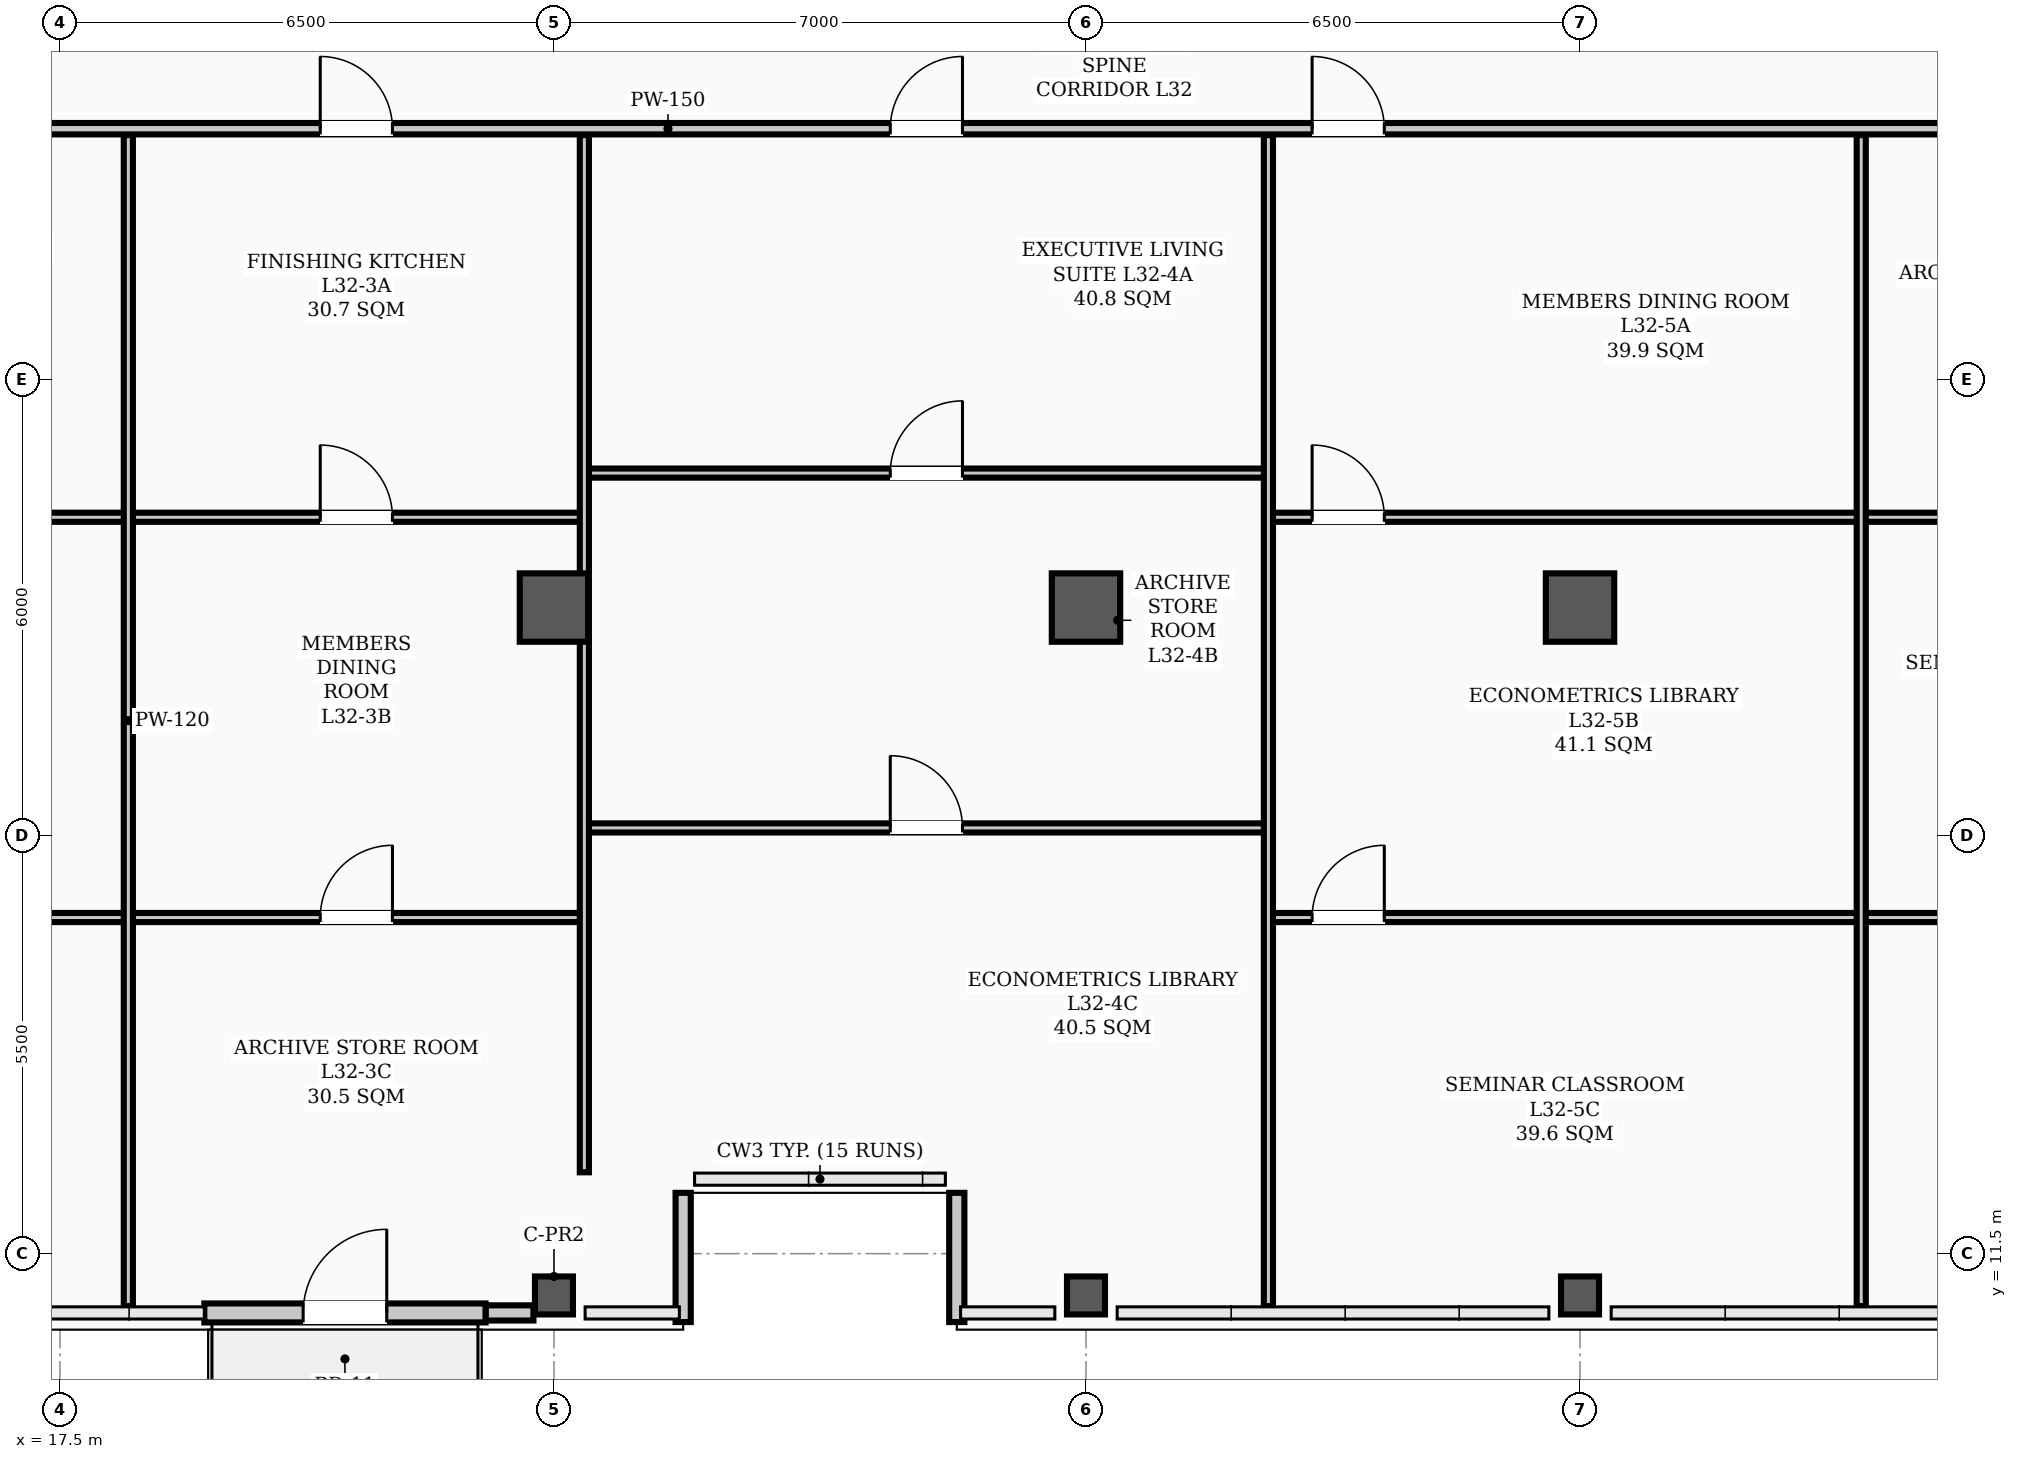
"""IFC4 building model, lengths in metres.
Left out: names, types, materials, properties, quantities, classifications, styles, units other than length and angle.
Written with IfcOpenShell. Run it as: python <this file> out.ifc"""

import sys

from ifc_helpers import new_model, si_unit, direction, frame, frame_2d, origin, origin_2d, place, context, subcontext, project, spatial, rectangle, hollow_rectangle, extrude, element, fill, save


model = new_model("IFC4")
c1 = context("Model", 3, precision=1e-05, world=origin(), true_north=direction((0.0, 1.0)))
c2 = subcontext(c1, "Body", "Model", "MODEL_VIEW")
j1 = project(units=[si_unit("LENGTHUNIT", "METRE"), si_unit("PLANEANGLEUNIT", "RADIAN")], contexts=[c1])
p1 = place(None, origin())
s1 = spatial("IfcSite", under=j1, at=p1, CompositionType="ELEMENT")
p2 = place(p1, origin())
s2 = spatial("IfcBuilding", under=s1, at=p2, CompositionType="ELEMENT")
p3 = place(p2, frame((0.0, 0.0, 130.5)))
s3 = spatial("IfcBuildingStorey", under=s2, at=p3, CompositionType="ELEMENT", Elevation=130.5)
for number, where, z_axis, x_axis in (
    (1, (24.0, 20.0, 0.0), (0.0, 0.0, 1.0), (1.0, 0.0, 0.0)),
    (2, (31.0, 20.0, 0.0), (0.0, 0.0, 1.0), (1.0, 0.0, 0.0)),
    (3, (37.5, 20.0, 0.0), (0.0, 0.0, 1.0), (1.0, 0.0, 0.0)),
):
    element("IfcColumn", number, at=place(p3, frame(where, z_axis=z_axis, x_axis=x_axis)), inside=s3, PredefinedType="COLUMN", context=c2, shape_type="SweptSolid", body=[
        extrude(hollow_rectangle(XDim=0.9, YDim=0.9, WallThickness=0.035, InnerFilletRadius=0.017, OuterFilletRadius=0.052, at=origin_2d()), origin(), (0.0, 0.0, 1.0), 3.9),
    ])
for number, where, z_axis, x_axis in (
    (4, (24.0, 10.95, 0.0), (0.0, 0.0, 1.0), (1.0, 0.0, 0.0)),
    (5, (31.0, 10.95, 0.0), (0.0, 0.0, 1.0), (1.0, 0.0, 0.0)),
    (6, (37.5, 10.95, 0.0), (0.0, 0.0, 1.0), (1.0, 0.0, 0.0)),
):
    element("IfcColumn", number, at=place(p3, frame(where, z_axis=z_axis, x_axis=x_axis)), inside=s3, PredefinedType="COLUMN", context=c2, shape_type="SweptSolid", body=[
        extrude(hollow_rectangle(XDim=0.5, YDim=0.5, WallThickness=0.024, InnerFilletRadius=0.012, OuterFilletRadius=0.036, at=origin_2d()), origin(), (0.0, 0.0, 1.0), 3.9),
    ])
p4 = place(p3, frame((23.1, 10.72, 0.0), z_axis=(0.0, 0.0, 1.0), x_axis=(1.0, 0.0, 0.0)))
e7 = element("IfcWall", 7, at=p4, inside=s3, PredefinedType="PARAPET", context=c2, shape_type="SweptSolid", body=[
    extrude(rectangle(XDim=0.63, YDim=0.2, at=frame_2d((0.315, 0.0))), origin(), (0.0, 0.0, 1.0), 1.2),
])
for number, where, z_axis, x_axis in (
    (8, (25.7, 10.6, 0.0), (0.0, 0.0, 1.0), (0.0, 1.0, 0.0)),
    (9, (29.3, 12.3, 0.0), (0.0, 0.0, 1.0), (0.0, -1.0, 0.0)),
):
    element("IfcWall", number, at=place(p3, frame(where, z_axis=z_axis, x_axis=x_axis)), inside=s3, PredefinedType="PARAPET", context=c2, shape_type="SweptSolid", body=[
        extrude(rectangle(XDim=1.7, YDim=0.2, at=frame_2d((0.85, 0.0))), origin(), (0.0, 0.0, 1.0), 1.2),
    ])
p5 = place(p3, frame((19.4, 10.72, 0.0), z_axis=(0.0, 0.0, 1.0), x_axis=(1.0, 0.0, 0.0)))
e10 = element("IfcWall", 10, at=p5, inside=s3, PredefinedType="STANDARD", context=c2, shape_type="SweptSolid", body=[
    extrude(rectangle(XDim=3.7, YDim=0.25, at=frame_2d((1.85, 0.0))), origin(), (0.0, 0.0, 1.0), 3.18),
])
p6 = place(p5, frame((1.3, 0.0, 0.0)))
e11 = element("IfcOpeningElement", 11, at=p6, cuts=e10, PredefinedType="OPENING", context=c2, shape_type="SweptSolid", body=[
    extrude(rectangle(XDim=1.1, YDim=2.2, at=frame_2d((0.55, 1.1))), frame((0.0, 0.135, 0.0), z_axis=(0.0, -1.0, 0.0), x_axis=(1.0, 0.0, 0.0)), (0.0, 0.0, 1.0), 0.27),
])
p7 = place(p3, frame((2.31, 26.3, 0.0), z_axis=(0.0, 0.0, 1.0), x_axis=(1.0, 0.0, 0.0)))
e12 = element("IfcWall", 12, at=p7, inside=s3, PredefinedType="PARTITIONING", context=c2, shape_type="SweptSolid", body=[
    extrude(rectangle(XDim=46.38, YDim=0.15, at=frame_2d((23.19, 0.0))), origin(), (0.0, 0.0, 1.0), 3.1),
])
p8 = place(p7, frame((12.515, 0.0, 0.0)))
e13 = element("IfcOpeningElement", 13, at=p8, cuts=e12, PredefinedType="OPENING", context=c2, shape_type="SweptSolid", body=[
    extrude(rectangle(XDim=0.95, YDim=2.08, at=frame_2d((0.475, 1.04))), frame((0.0, 0.085, 0.0), z_axis=(0.0, -1.0, 0.0), x_axis=(1.0, 0.0, 0.0)), (0.0, 0.0, 1.0), 0.17),
])
p9 = place(p7, frame((18.615, 0.0, 0.0)))
e14 = element("IfcOpeningElement", 14, at=p9, cuts=e12, PredefinedType="OPENING", context=c2, shape_type="SweptSolid", body=[
    extrude(rectangle(XDim=0.95, YDim=2.08, at=frame_2d((0.475, 1.04))), frame((0.0, 0.085, 0.0), z_axis=(0.0, -1.0, 0.0), x_axis=(1.0, 0.0, 0.0)), (0.0, 0.0, 1.0), 0.17),
])
p10 = place(p7, frame((26.115, 0.0, 0.0)))
e15 = element("IfcOpeningElement", 15, at=p10, cuts=e12, PredefinedType="OPENING", context=c2, shape_type="SweptSolid", body=[
    extrude(rectangle(XDim=0.95, YDim=2.08, at=frame_2d((0.475, 1.04))), frame((0.0, 0.085, 0.0), z_axis=(0.0, -1.0, 0.0), x_axis=(1.0, 0.0, 0.0)), (0.0, 0.0, 1.0), 0.17),
])
p11 = place(p7, frame((31.665, 0.0, 0.0)))
e16 = element("IfcOpeningElement", 16, at=p11, cuts=e12, PredefinedType="OPENING", context=c2, shape_type="SweptSolid", body=[
    extrude(rectangle(XDim=0.95, YDim=2.08, at=frame_2d((0.475, 1.04))), frame((0.0, 0.085, 0.0), z_axis=(0.0, -1.0, 0.0), x_axis=(1.0, 0.0, 0.0)), (0.0, 0.0, 1.0), 0.17),
])
p12 = place(p7, frame((43.06, 0.0, 0.0)))
e17 = element("IfcOpeningElement", 17, at=p12, cuts=e12, PredefinedType="OPENING", context=c2, shape_type="SweptSolid", body=[
    extrude(rectangle(XDim=0.95, YDim=2.08, at=frame_2d((0.475, 1.04))), frame((0.0, 0.085, 0.0), z_axis=(0.0, -1.0, 0.0), x_axis=(1.0, 0.0, 0.0)), (0.0, 0.0, 1.0), 0.17),
])
p13 = place(p3, frame((12.2, 21.188, 0.0), z_axis=(0.0, 0.0, 1.0), x_axis=(1.0, 0.0, 0.0)))
e18 = element("IfcWall", 18, at=p13, inside=s3, PredefinedType="PARTITIONING", context=c2, shape_type="SweptSolid", body=[
    extrude(rectangle(XDim=6.2, YDim=0.12, at=frame_2d((3.1, 0.0))), origin(), (0.0, 0.0, 1.0), 3.1),
])
p14 = place(p13, frame((2.625, 0.0, 0.0)))
e19 = element("IfcOpeningElement", 19, at=p14, cuts=e18, PredefinedType="OPENING", context=c2, shape_type="SweptSolid", body=[
    extrude(rectangle(XDim=0.95, YDim=2.08, at=frame_2d((0.475, 1.04))), frame((0.0, 0.07, 0.0), z_axis=(0.0, -1.0, 0.0), x_axis=(1.0, 0.0, 0.0)), (0.0, 0.0, 1.0), 0.14),
])
p15 = place(p3, frame((12.2, 15.922, 0.0), z_axis=(0.0, 0.0, 1.0), x_axis=(1.0, 0.0, 0.0)))
e20 = element("IfcWall", 20, at=p15, inside=s3, PredefinedType="PARTITIONING", context=c2, shape_type="SweptSolid", body=[
    extrude(rectangle(XDim=6.2, YDim=0.12, at=frame_2d((3.1, 0.0))), origin(), (0.0, 0.0, 1.0), 3.1),
])
p16 = place(p15, frame((2.625, 0.0, 0.0)))
e21 = element("IfcOpeningElement", 21, at=p16, cuts=e20, PredefinedType="OPENING", context=c2, shape_type="SweptSolid", body=[
    extrude(rectangle(XDim=0.95, YDim=2.08, at=frame_2d((0.475, 1.04))), frame((0.0, 0.07, 0.0), z_axis=(0.0, -1.0, 0.0), x_axis=(1.0, 0.0, 0.0)), (0.0, 0.0, 1.0), 0.14),
])
p17 = place(p3, frame((18.4, 21.188, 0.0), z_axis=(0.0, 0.0, 1.0), x_axis=(1.0, 0.0, 0.0)))
e22 = element("IfcWall", 22, at=p17, inside=s3, PredefinedType="PARTITIONING", context=c2, shape_type="SweptSolid", body=[
    extrude(rectangle(XDim=6.0, YDim=0.12, at=frame_2d((3.0, 0.0))), origin(), (0.0, 0.0, 1.0), 3.1),
])
p18 = place(p17, frame((2.525, 0.0, 0.0)))
e23 = element("IfcOpeningElement", 23, at=p18, cuts=e22, PredefinedType="OPENING", context=c2, shape_type="SweptSolid", body=[
    extrude(rectangle(XDim=0.95, YDim=2.08, at=frame_2d((0.475, 1.04))), frame((0.0, 0.07, 0.0), z_axis=(0.0, -1.0, 0.0), x_axis=(1.0, 0.0, 0.0)), (0.0, 0.0, 1.0), 0.14),
])
p19 = place(p3, frame((18.4, 15.922, 0.0), z_axis=(0.0, 0.0, 1.0), x_axis=(1.0, 0.0, 0.0)))
e24 = element("IfcWall", 24, at=p19, inside=s3, PredefinedType="PARTITIONING", context=c2, shape_type="SweptSolid", body=[
    extrude(rectangle(XDim=6.0, YDim=0.12, at=frame_2d((3.0, 0.0))), origin(), (0.0, 0.0, 1.0), 3.1),
])
p20 = place(p19, frame((2.525, 0.0, 0.0)))
e25 = element("IfcOpeningElement", 25, at=p20, cuts=e24, PredefinedType="OPENING", context=c2, shape_type="SweptSolid", body=[
    extrude(rectangle(XDim=0.95, YDim=2.08, at=frame_2d((0.475, 1.04))), frame((0.0, 0.07, 0.0), z_axis=(0.0, -1.0, 0.0), x_axis=(1.0, 0.0, 0.0)), (0.0, 0.0, 1.0), 0.14),
])
p21 = place(p3, frame((24.4, 21.769, 0.0), z_axis=(0.0, 0.0, 1.0), x_axis=(1.0, 0.0, 0.0)))
e26 = element("IfcWall", 26, at=p21, inside=s3, PredefinedType="PARTITIONING", context=c2, shape_type="SweptSolid", body=[
    extrude(rectangle(XDim=9.0, YDim=0.12, at=frame_2d((4.5, 0.0))), origin(), (0.0, 0.0, 1.0), 3.1),
])
p22 = place(p21, frame((4.025, 0.0, 0.0)))
e27 = element("IfcOpeningElement", 27, at=p22, cuts=e26, PredefinedType="OPENING", context=c2, shape_type="SweptSolid", body=[
    extrude(rectangle(XDim=0.95, YDim=2.08, at=frame_2d((0.475, 1.04))), frame((0.0, 0.07, 0.0), z_axis=(0.0, -1.0, 0.0), x_axis=(1.0, 0.0, 0.0)), (0.0, 0.0, 1.0), 0.14),
])
p23 = place(p3, frame((24.4, 17.101, 0.0), z_axis=(0.0, 0.0, 1.0), x_axis=(1.0, 0.0, 0.0)))
e28 = element("IfcWall", 28, at=p23, inside=s3, PredefinedType="PARTITIONING", context=c2, shape_type="SweptSolid", body=[
    extrude(rectangle(XDim=9.0, YDim=0.12, at=frame_2d((4.5, 0.0))), origin(), (0.0, 0.0, 1.0), 3.1),
])
p24 = place(p23, frame((4.025, 0.0, 0.0)))
e29 = element("IfcOpeningElement", 29, at=p24, cuts=e28, PredefinedType="OPENING", context=c2, shape_type="SweptSolid", body=[
    extrude(rectangle(XDim=0.95, YDim=2.08, at=frame_2d((0.475, 1.04))), frame((0.0, 0.07, 0.0), z_axis=(0.0, -1.0, 0.0), x_axis=(1.0, 0.0, 0.0)), (0.0, 0.0, 1.0), 0.14),
])
p25 = place(p3, frame((33.4, 21.188, 0.0), z_axis=(0.0, 0.0, 1.0), x_axis=(1.0, 0.0, 0.0)))
e30 = element("IfcWall", 30, at=p25, inside=s3, PredefinedType="PARTITIONING", context=c2, shape_type="SweptSolid", body=[
    extrude(rectangle(XDim=7.8, YDim=0.12, at=frame_2d((3.9, 0.0))), origin(), (0.0, 0.0, 1.0), 3.1),
])
p26 = place(p25, frame((0.575, 0.0, 0.0)))
e31 = element("IfcOpeningElement", 31, at=p26, cuts=e30, PredefinedType="OPENING", context=c2, shape_type="SweptSolid", body=[
    extrude(rectangle(XDim=0.95, YDim=2.08, at=frame_2d((0.475, 1.04))), frame((0.0, 0.07, 0.0), z_axis=(0.0, -1.0, 0.0), x_axis=(1.0, 0.0, 0.0)), (0.0, 0.0, 1.0), 0.14),
])
p27 = place(p3, frame((33.4, 15.922, 0.0), z_axis=(0.0, 0.0, 1.0), x_axis=(1.0, 0.0, 0.0)))
e32 = element("IfcWall", 32, at=p27, inside=s3, PredefinedType="PARTITIONING", context=c2, shape_type="SweptSolid", body=[
    extrude(rectangle(XDim=7.8, YDim=0.12, at=frame_2d((3.9, 0.0))), origin(), (0.0, 0.0, 1.0), 3.1),
])
p28 = place(p27, frame((0.575, 0.0, 0.0)))
e33 = element("IfcOpeningElement", 33, at=p28, cuts=e32, PredefinedType="OPENING", context=c2, shape_type="SweptSolid", body=[
    extrude(rectangle(XDim=0.95, YDim=2.08, at=frame_2d((0.475, 1.04))), frame((0.0, 0.07, 0.0), z_axis=(0.0, -1.0, 0.0), x_axis=(1.0, 0.0, 0.0)), (0.0, 0.0, 1.0), 0.14),
])
p29 = place(p3, frame((41.2, 21.188, 0.0), z_axis=(0.0, 0.0, 1.0), x_axis=(1.0, 0.0, 0.0)))
e34 = element("IfcWall", 34, at=p29, inside=s3, PredefinedType="PARTITIONING", context=c2, shape_type="SweptSolid", body=[
    extrude(rectangle(XDim=7.49, YDim=0.12, at=frame_2d((3.745, 0.0))), origin(), (0.0, 0.0, 1.0), 3.1),
])
p30 = place(p29, frame((4.17, 0.0, 0.0)))
e35 = element("IfcOpeningElement", 35, at=p30, cuts=e34, PredefinedType="OPENING", context=c2, shape_type="SweptSolid", body=[
    extrude(rectangle(XDim=0.95, YDim=2.08, at=frame_2d((0.475, 1.04))), frame((0.0, 0.07, 0.0), z_axis=(0.0, -1.0, 0.0), x_axis=(1.0, 0.0, 0.0)), (0.0, 0.0, 1.0), 0.14),
])
p31 = place(p3, frame((41.2, 15.922, 0.0), z_axis=(0.0, 0.0, 1.0), x_axis=(1.0, 0.0, 0.0)))
e36 = element("IfcWall", 36, at=p31, inside=s3, PredefinedType="PARTITIONING", context=c2, shape_type="SweptSolid", body=[
    extrude(rectangle(XDim=7.49, YDim=0.12, at=frame_2d((3.745, 0.0))), origin(), (0.0, 0.0, 1.0), 3.1),
])
p32 = place(p31, frame((4.17, 0.0, 0.0)))
e37 = element("IfcOpeningElement", 37, at=p32, cuts=e36, PredefinedType="OPENING", context=c2, shape_type="SweptSolid", body=[
    extrude(rectangle(XDim=0.95, YDim=2.08, at=frame_2d((0.475, 1.04))), frame((0.0, 0.07, 0.0), z_axis=(0.0, -1.0, 0.0), x_axis=(1.0, 0.0, 0.0)), (0.0, 0.0, 1.0), 0.14),
])
p33 = place(p3, frame((18.4, 10.81, 0.0), z_axis=(0.0, 0.0, 1.0), x_axis=(0.0, 1.0, 0.0)))
e38 = element("IfcWall", 38, at=p33, inside=s3, PredefinedType="PARTITIONING", context=c2, shape_type="SweptSolid", body=[
    extrude(rectangle(XDim=15.405, YDim=0.12, at=frame_2d((7.703, 0.0))), origin(), (0.0, 0.0, 1.0), 3.0),
])
p34 = place(p3, frame((24.4, 12.57, 0.0), z_axis=(0.0, 0.0, 1.0), x_axis=(0.0, 1.0, 0.0)))
e39 = element("IfcWall", 39, at=p34, inside=s3, PredefinedType="PARTITIONING", context=c2, shape_type="SweptSolid", body=[
    extrude(rectangle(XDim=13.645, YDim=0.12, at=frame_2d((6.823, 0.0))), origin(), (0.0, 0.0, 1.0), 3.0),
])
for number, where, z_axis, x_axis in (
    (40, (33.4, 10.81, 0.0), (0.0, 0.0, 1.0), (0.0, 1.0, 0.0)),
    (41, (41.2, 10.81, 0.0), (0.0, 0.0, 1.0), (0.0, 1.0, 0.0)),
):
    element("IfcWall", number, at=place(p3, frame(where, z_axis=z_axis, x_axis=x_axis)), inside=s3, PredefinedType="PARTITIONING", context=c2, shape_type="SweptSolid", body=[
        extrude(rectangle(XDim=15.405, YDim=0.12, at=frame_2d((7.703, 0.0))), origin(), (0.0, 0.0, 1.0), 3.0),
    ])
p35 = place(p6, origin())
e42 = element("IfcDoor", 42, at=p35, inside=s3, OperationType="SINGLE_SWING_RIGHT", PredefinedType="DOOR", context=c2, shape_type="SweptSolid", body=[
    extrude(rectangle(XDim=1.1, YDim=2.2, at=frame_2d((0.55, 1.1))), frame((0.0, 0.025, 0.0), z_axis=(0.0, -1.0, 0.0), x_axis=(1.0, 0.0, 0.0)), (0.0, 0.0, 1.0), 0.05),
])
fill(e11, e42)
p36 = place(p18, origin())
e43 = element("IfcDoor", 43, at=p36, inside=s3, OperationType="SINGLE_SWING_LEFT", PredefinedType="DOOR", context=c2, shape_type="SweptSolid", body=[
    extrude(rectangle(XDim=0.95, YDim=2.08, at=frame_2d((0.475, 1.04))), frame((0.0, 0.025, 0.0), z_axis=(0.0, -1.0, 0.0), x_axis=(1.0, 0.0, 0.0)), (0.0, 0.0, 1.0), 0.05),
])
fill(e23, e43)
p37 = place(p20, origin())
e44 = element("IfcDoor", 44, at=p37, inside=s3, OperationType="SINGLE_SWING_RIGHT", PredefinedType="DOOR", context=c2, shape_type="SweptSolid", body=[
    extrude(rectangle(XDim=0.95, YDim=2.08, at=frame_2d((0.475, 1.04))), frame((0.0, 0.025, 0.0), z_axis=(0.0, -1.0, 0.0), x_axis=(1.0, 0.0, 0.0)), (0.0, 0.0, 1.0), 0.05),
])
fill(e25, e44)
p38 = place(p9, origin())
e45 = element("IfcDoor", 45, at=p38, inside=s3, OperationType="SINGLE_SWING_LEFT", PredefinedType="DOOR", context=c2, shape_type="SweptSolid", body=[
    extrude(rectangle(XDim=0.95, YDim=2.08, at=frame_2d((0.475, 1.04))), frame((0.0, 0.025, 0.0), z_axis=(0.0, -1.0, 0.0), x_axis=(1.0, 0.0, 0.0)), (0.0, 0.0, 1.0), 0.05),
])
fill(e14, e45)
p39 = place(p22, origin())
e46 = element("IfcDoor", 46, at=p39, inside=s3, OperationType="SINGLE_SWING_RIGHT", PredefinedType="DOOR", context=c2, shape_type="SweptSolid", body=[
    extrude(rectangle(XDim=0.95, YDim=2.08, at=frame_2d((0.475, 1.04))), frame((0.0, 0.025, 0.0), z_axis=(0.0, -1.0, 0.0), x_axis=(1.0, 0.0, 0.0)), (0.0, 0.0, 1.0), 0.05),
])
fill(e27, e46)
p40 = place(p24, origin())
e47 = element("IfcDoor", 47, at=p40, inside=s3, OperationType="SINGLE_SWING_LEFT", PredefinedType="DOOR", context=c2, shape_type="SweptSolid", body=[
    extrude(rectangle(XDim=0.95, YDim=2.08, at=frame_2d((0.475, 1.04))), frame((0.0, 0.025, 0.0), z_axis=(0.0, -1.0, 0.0), x_axis=(1.0, 0.0, 0.0)), (0.0, 0.0, 1.0), 0.05),
])
fill(e29, e47)
p41 = place(p10, origin())
e48 = element("IfcDoor", 48, at=p41, inside=s3, OperationType="SINGLE_SWING_RIGHT", PredefinedType="DOOR", context=c2, shape_type="SweptSolid", body=[
    extrude(rectangle(XDim=0.95, YDim=2.08, at=frame_2d((0.475, 1.04))), frame((0.0, 0.025, 0.0), z_axis=(0.0, -1.0, 0.0), x_axis=(1.0, 0.0, 0.0)), (0.0, 0.0, 1.0), 0.05),
])
fill(e15, e48)
p42 = place(p26, origin())
e49 = element("IfcDoor", 49, at=p42, inside=s3, OperationType="SINGLE_SWING_LEFT", PredefinedType="DOOR", context=c2, shape_type="SweptSolid", body=[
    extrude(rectangle(XDim=0.95, YDim=2.08, at=frame_2d((0.475, 1.04))), frame((0.0, 0.025, 0.0), z_axis=(0.0, -1.0, 0.0), x_axis=(1.0, 0.0, 0.0)), (0.0, 0.0, 1.0), 0.05),
])
fill(e31, e49)
p43 = place(p28, origin())
e50 = element("IfcDoor", 50, at=p43, inside=s3, OperationType="SINGLE_SWING_RIGHT", PredefinedType="DOOR", context=c2, shape_type="SweptSolid", body=[
    extrude(rectangle(XDim=0.95, YDim=2.08, at=frame_2d((0.475, 1.04))), frame((0.0, 0.025, 0.0), z_axis=(0.0, -1.0, 0.0), x_axis=(1.0, 0.0, 0.0)), (0.0, 0.0, 1.0), 0.05),
])
fill(e33, e50)
p44 = place(p11, origin())
e51 = element("IfcDoor", 51, at=p44, inside=s3, OperationType="SINGLE_SWING_LEFT", PredefinedType="DOOR", context=c2, shape_type="SweptSolid", body=[
    extrude(rectangle(XDim=0.95, YDim=2.08, at=frame_2d((0.475, 1.04))), frame((0.0, 0.025, 0.0), z_axis=(0.0, -1.0, 0.0), x_axis=(1.0, 0.0, 0.0)), (0.0, 0.0, 1.0), 0.05),
])
fill(e16, e51)
save(model, sys.argv[1])
